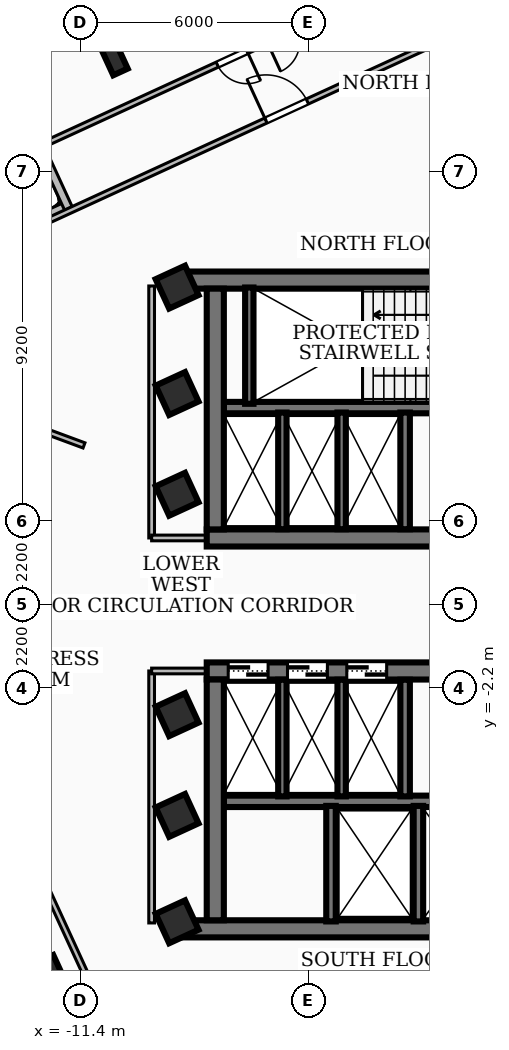
"""IFC4 building model, lengths in metres.
Left out: names, types, materials, properties, quantities, classifications, styles, units other than length and angle.
Written with IfcOpenShell. Run it as: python <this file> out.ifc"""

import sys

from ifc_helpers import new_model, si_unit, direction, frame, frame_2d, origin, origin_2d, place, context, subcontext, project, spatial, rectangle, i_section, extrude, element, fill, save


model = new_model("IFC4")
c1 = context("Model", 3, precision=1e-05, world=origin(), true_north=direction((0.0, 1.0)))
c2 = subcontext(c1, "Body", "Model", "MODEL_VIEW")
j1 = project(units=[si_unit("LENGTHUNIT", "METRE"), si_unit("PLANEANGLEUNIT", "RADIAN")], contexts=[c1])
p1 = place(None, origin())
s1 = spatial("IfcSite", under=j1, at=p1, CompositionType="ELEMENT")
p2 = place(p1, origin())
s2 = spatial("IfcBuilding", under=s1, at=p2, CompositionType="ELEMENT")
p3 = place(p2, frame((0.0, 0.0, 184.68)))
s3 = spatial("IfcBuildingStorey", under=s2, at=p3, CompositionType="ELEMENT", Elevation=184.68)
p4 = place(p3, frame((-8.78, 8.535, 0.0), z_axis=(0.0, 0.0, 1.0), x_axis=(1.0, 0.0, 0.0)))
e1 = element("IfcWall", 1, at=p4, inside=s3, PredefinedType="SHEAR", context=c2, shape_type="SweptSolid", body=[
    extrude(rectangle(XDim=17.56, YDim=0.45, at=frame_2d((8.78, 0.0))), origin(), (0.0, 0.0, 1.0), 3.34),
])
p5 = place(p3, frame((8.07, 1.75, 0.0), z_axis=(0.0, 0.0, 1.0), x_axis=(-1.0, 0.0, 0.0)))
e2 = element("IfcWall", 2, at=p5, inside=s3, PredefinedType="SHEAR", context=c2, shape_type="SweptSolid", body=[
    extrude(rectangle(XDim=16.14, YDim=0.45, at=frame_2d((8.07, 0.0))), origin(), (0.0, 0.0, 1.0), 3.34),
])
p6 = place(p5, frame((7.45, 0.0, 0.0)))
e3 = element("IfcOpeningElement", 3, at=p6, cuts=e2, PredefinedType="OPENING", context=c2, shape_type="SweptSolid", body=[
    extrude(rectangle(XDim=1.0, YDim=2.1, at=frame_2d((0.5, 1.05))), frame((0.0, 0.235, 0.0), z_axis=(0.0, -1.0, 0.0), x_axis=(1.0, 0.0, 0.0)), (0.0, 0.0, 1.0), 0.47),
])
p7 = place(p5, frame((3.4, 0.0, 0.0)))
e4 = element("IfcOpeningElement", 4, at=p7, cuts=e2, PredefinedType="OPENING", context=c2, shape_type="SweptSolid", body=[
    extrude(rectangle(XDim=0.9, YDim=2.06, at=frame_2d((0.45, 1.03))), frame((0.0, 0.235, 0.0), z_axis=(0.0, -1.0, 0.0), x_axis=(1.0, 0.0, 0.0)), (0.0, 0.0, 1.0), 0.47),
])
p8 = place(p5, frame((1.1, 0.0, 0.0)))
e5 = element("IfcOpeningElement", 5, at=p8, cuts=e2, PredefinedType="OPENING", context=c2, shape_type="SweptSolid", body=[
    extrude(rectangle(XDim=0.9, YDim=2.06, at=frame_2d((0.45, 1.03))), frame((0.0, 0.235, 0.0), z_axis=(0.0, -1.0, 0.0), x_axis=(1.0, 0.0, 0.0)), (0.0, 0.0, 1.0), 0.47),
])
p9 = place(p3, frame((-7.845, 1.975, 0.0), z_axis=(0.0, 0.0, 1.0), x_axis=(0.0, 1.0, 0.0)))
e6 = element("IfcWall", 6, at=p9, inside=s3, PredefinedType="SHEAR", context=c2, shape_type="SweptSolid", body=[
    extrude(rectangle(XDim=6.335, YDim=0.45, at=frame_2d((3.167, 0.0))), origin(), (0.0, 0.0, 1.0), 3.34),
])
p10 = place(p3, frame((7.62, 5.18, 0.0), z_axis=(0.0, 0.0, 1.0), x_axis=(-1.0, 0.0, 0.0)))
e7 = element("IfcWall", 7, at=p10, inside=s3, PredefinedType="SOLIDWALL", context=c2, shape_type="SweptSolid", body=[
    extrude(rectangle(XDim=15.24, YDim=0.3, at=frame_2d((7.62, 0.0))), origin(), (0.0, 0.0, 1.0), 3.34),
])
p11 = place(p10, frame((5.77, 0.0, 0.0)))
e8 = element("IfcOpeningElement", 8, at=p11, cuts=e7, PredefinedType="OPENING", context=c2, shape_type="SweptSolid", body=[
    extrude(rectangle(XDim=1.1, YDim=2.15, at=frame_2d((0.55, 1.075))), frame((0.0, 0.16, 0.0), z_axis=(0.0, -1.0, 0.0), x_axis=(1.0, 0.0, 0.0)), (0.0, 0.0, 1.0), 0.32),
])
p12 = place(p10, frame((2.97, 0.0, 0.0)))
e9 = element("IfcOpeningElement", 9, at=p12, cuts=e7, PredefinedType="OPENING", context=c2, shape_type="SweptSolid", body=[
    extrude(rectangle(XDim=1.1, YDim=2.15, at=frame_2d((0.55, 1.075))), frame((0.0, 0.16, 0.0), z_axis=(0.0, -1.0, 0.0), x_axis=(1.0, 0.0, 0.0)), (0.0, 0.0, 1.0), 0.32),
])
p13 = place(p10, frame((7.97, 0.0, 0.0)))
e10 = element("IfcOpeningElement", 10, at=p13, cuts=e7, PredefinedType="OPENING", context=c2, shape_type="SweptSolid", body=[
    extrude(rectangle(XDim=1.0, YDim=2.1, at=frame_2d((0.5, 1.05))), frame((0.0, 0.16, 0.0), z_axis=(0.0, -1.0, 0.0), x_axis=(1.0, 0.0, 0.0)), (0.0, 0.0, 1.0), 0.32),
])
p14 = place(p3, frame((8.78, -8.535, 0.0), z_axis=(0.0, 0.0, 1.0), x_axis=(-1.0, 0.0, 0.0)))
e11 = element("IfcWall", 11, at=p14, inside=s3, PredefinedType="SHEAR", context=c2, shape_type="SweptSolid", body=[
    extrude(rectangle(XDim=17.56, YDim=0.45, at=frame_2d((8.78, 0.0))), origin(), (0.0, 0.0, 1.0), 3.34),
])
p15 = place(p3, frame((-8.07, -1.75, 0.0), z_axis=(0.0, 0.0, 1.0), x_axis=(1.0, 0.0, 0.0)))
e12 = element("IfcWall", 12, at=p15, inside=s3, PredefinedType="SHEAR", context=c2, shape_type="SweptSolid", body=[
    extrude(rectangle(XDim=16.14, YDim=0.45, at=frame_2d((8.07, 0.0))), origin(), (0.0, 0.0, 1.0), 3.34),
])
p16 = place(p15, frame((7.45, 0.0, 0.0)))
e13 = element("IfcOpeningElement", 13, at=p16, cuts=e12, PredefinedType="OPENING", context=c2, shape_type="SweptSolid", body=[
    extrude(rectangle(XDim=1.0, YDim=2.1, at=frame_2d((0.5, 1.05))), frame((0.0, 0.235, 0.0), z_axis=(0.0, -1.0, 0.0), x_axis=(1.0, 0.0, 0.0)), (0.0, 0.0, 1.0), 0.47),
])
p17 = place(p15, frame((12.65, 0.0, 0.0)))
e14 = element("IfcOpeningElement", 14, at=p17, cuts=e12, PredefinedType="OPENING", context=c2, shape_type="SweptSolid", body=[
    extrude(rectangle(XDim=0.9, YDim=2.06, at=frame_2d((0.45, 1.03))), frame((0.0, 0.235, 0.0), z_axis=(0.0, -1.0, 0.0), x_axis=(1.0, 0.0, 0.0)), (0.0, 0.0, 1.0), 0.47),
])
p18 = place(p15, frame((0.565, 0.0, 0.0)))
e15 = element("IfcOpeningElement", 15, at=p18, cuts=e12, PredefinedType="OPENING", context=c2, shape_type="SweptSolid", body=[
    extrude(rectangle(XDim=1.05, YDim=2.15, at=frame_2d((0.525, 1.075))), frame((0.0, 0.235, 0.0), z_axis=(0.0, -1.0, 0.0), x_axis=(1.0, 0.0, 0.0)), (0.0, 0.0, 1.0), 0.47),
])
p19 = place(p15, frame((2.125, 0.0, 0.0)))
e16 = element("IfcOpeningElement", 16, at=p19, cuts=e12, PredefinedType="OPENING", context=c2, shape_type="SweptSolid", body=[
    extrude(rectangle(XDim=1.05, YDim=2.15, at=frame_2d((0.525, 1.075))), frame((0.0, 0.235, 0.0), z_axis=(0.0, -1.0, 0.0), x_axis=(1.0, 0.0, 0.0)), (0.0, 0.0, 1.0), 0.47),
])
p20 = place(p15, frame((3.685, 0.0, 0.0)))
e17 = element("IfcOpeningElement", 17, at=p20, cuts=e12, PredefinedType="OPENING", context=c2, shape_type="SweptSolid", body=[
    extrude(rectangle(XDim=1.05, YDim=2.15, at=frame_2d((0.525, 1.075))), frame((0.0, 0.235, 0.0), z_axis=(0.0, -1.0, 0.0), x_axis=(1.0, 0.0, 0.0)), (0.0, 0.0, 1.0), 0.47),
])
p21 = place(p3, frame((-7.845, -8.31, 0.0), z_axis=(0.0, 0.0, 1.0), x_axis=(0.0, 1.0, 0.0)))
e18 = element("IfcWall", 18, at=p21, inside=s3, PredefinedType="SHEAR", context=c2, shape_type="SweptSolid", body=[
    extrude(rectangle(XDim=6.335, YDim=0.45, at=frame_2d((3.167, 0.0))), origin(), (0.0, 0.0, 1.0), 3.34),
])
p22 = place(p3, frame((-7.62, -5.18, 0.0), z_axis=(0.0, 0.0, 1.0), x_axis=(1.0, 0.0, 0.0)))
e19 = element("IfcWall", 19, at=p22, inside=s3, PredefinedType="SOLIDWALL", context=c2, shape_type="SweptSolid", body=[
    extrude(rectangle(XDim=15.24, YDim=0.3, at=frame_2d((7.62, 0.0))), origin(), (0.0, 0.0, 1.0), 3.34),
])
p23 = place(p22, frame((5.77, 0.0, 0.0)))
e20 = element("IfcOpeningElement", 20, at=p23, cuts=e19, PredefinedType="OPENING", context=c2, shape_type="SweptSolid", body=[
    extrude(rectangle(XDim=1.1, YDim=2.15, at=frame_2d((0.55, 1.075))), frame((0.0, 0.16, 0.0), z_axis=(0.0, -1.0, 0.0), x_axis=(1.0, 0.0, 0.0)), (0.0, 0.0, 1.0), 0.32),
])
p24 = place(p22, frame((7.97, 0.0, 0.0)))
e21 = element("IfcOpeningElement", 21, at=p24, cuts=e19, PredefinedType="OPENING", context=c2, shape_type="SweptSolid", body=[
    extrude(rectangle(XDim=1.0, YDim=2.1, at=frame_2d((0.5, 1.05))), frame((0.0, 0.16, 0.0), z_axis=(0.0, -1.0, 0.0), x_axis=(1.0, 0.0, 0.0)), (0.0, 0.0, 1.0), 0.32),
])
p25 = place(p3, frame((-6.95, 5.28, 0.0), z_axis=(0.0, 0.0, 1.0), x_axis=(0.0, 1.0, 0.0)))
e22 = element("IfcWall", 22, at=p25, inside=s3, PredefinedType="SOLIDWALL", context=c2, shape_type="SweptSolid", body=[
    extrude(rectangle(XDim=3.06, YDim=0.22, at=frame_2d((1.53, 0.0))), origin(), (0.0, 0.0, 1.0), 3.34),
])
p26 = place(p3, frame((-2.85, 1.98, 0.0), z_axis=(0.0, 0.0, 1.0), x_axis=(0.0, 1.0, 0.0)))
e23 = element("IfcWall", 23, at=p26, inside=s3, PredefinedType="SOLIDWALL", context=c2, shape_type="SweptSolid", body=[
    extrude(rectangle(XDim=3.07, YDim=0.25, at=frame_2d((1.535, 0.0))), origin(), (0.0, 0.0, 1.0), 3.34),
])
for number, where, z_axis, x_axis in (
    (24, (-2.5, -8.34, 0.0), (0.0, 0.0, 1.0), (0.0, 1.0, 0.0)),
    (25, (-4.8, -8.34, 0.0), (0.0, 0.0, 1.0), (0.0, 1.0, 0.0)),
):
    element("IfcWall", number, at=place(p3, frame(where, z_axis=z_axis, x_axis=x_axis)), inside=s3, PredefinedType="SOLIDWALL", context=c2, shape_type="SweptSolid", body=[
        extrude(rectangle(XDim=3.04, YDim=0.25, at=frame_2d((1.52, 0.0))), origin(), (0.0, 0.0, 1.0), 3.34),
    ])
p27 = place(p3, frame((-2.85, -5.05, 0.0), z_axis=(0.0, 0.0, 1.0), x_axis=(0.0, 1.0, 0.0)))
e26 = element("IfcWall", 26, at=p27, inside=s3, PredefinedType="SOLIDWALL", context=c2, shape_type="SweptSolid", body=[
    extrude(rectangle(XDim=3.07, YDim=0.25, at=frame_2d((1.535, 0.0))), origin(), (0.0, 0.0, 1.0), 3.34),
])
for number, where, z_axis, x_axis in (
    (27, (-6.08, 1.98, 0.0), (0.0, 0.0, 1.0), (0.0, 1.0, 0.0)),
    (28, (-4.52, 1.98, 0.0), (0.0, 0.0, 1.0), (0.0, 1.0, 0.0)),
    (29, (-6.08, -5.05, 0.0), (0.0, 0.0, 1.0), (0.0, 1.0, 0.0)),
    (30, (-4.52, -5.05, 0.0), (0.0, 0.0, 1.0), (0.0, 1.0, 0.0)),
):
    element("IfcWall", number, at=place(p3, frame(where, z_axis=z_axis, x_axis=x_axis)), inside=s3, PredefinedType="SOLIDWALL", context=c2, shape_type="SweptSolid", body=[
        extrude(rectangle(XDim=3.07, YDim=0.22, at=frame_2d((1.535, 0.0))), origin(), (0.0, 0.0, 1.0), 3.34),
    ])
for number, where, z_axis, x_axis in (
    (31, (-8.85, -5.55, 0.0), (0.0, 0.0, 1.0), (0.909, 0.418, 0.0)),
    (32, (-8.85, -2.9, 0.0), (0.0, 0.0, 1.0), (0.909, 0.418, 0.0)),
    (33, (-8.85, 2.9, 0.0), (0.0, 0.0, 1.0), (0.909, 0.418, 0.0)),
    (34, (-8.85, 5.55, 0.0), (0.0, 0.0, 1.0), (0.909, 0.418, 0.0)),
    (35, (-8.85, 8.35, 0.0), (0.0, 0.0, 1.0), (0.909, 0.418, 0.0)),
    (36, (-8.85, -8.35, 0.0), (0.0, 0.0, 1.0), (0.909, 0.418, 0.0)),
):
    element("IfcColumn", number, at=place(p3, frame(where, z_axis=z_axis, x_axis=x_axis)), inside=s3, PredefinedType="COLUMN", context=c2, shape_type="SweptSolid", body=[
        extrude(rectangle(XDim=0.85, YDim=0.85, at=origin_2d()), origin(), (0.0, 0.0, 1.0), 3.6),
    ])
for number, where, z_axis, x_axis in (
    (37, (-10.533, 14.433, 0.0), (0.0, 0.0, 1.0), (0.909, 0.418, 0.0)),
    (38, (-12.106, -9.731, 0.0), (0.0, 0.0, 1.0), (0.909, 0.418, 0.0)),
):
    element("IfcColumn", number, at=place(p3, frame(where, z_axis=z_axis, x_axis=x_axis)), inside=s3, PredefinedType="COLUMN", context=c2, shape_type="SweptSolid", body=[
        extrude(i_section(OverallWidth=0.418, OverallDepth=0.927, WebThickness=0.019, FlangeThickness=0.032, at=origin_2d()), origin(), (0.0, 0.0, 1.0), 3.6),
    ])
p28 = place(p3, frame((-17.806, 7.71, 0.0), z_axis=(0.0, 0.0, 1.0), x_axis=(0.908646468859, 0.417566275734, 0.0)))
e39 = element("IfcWall", 39, at=p28, inside=s3, PredefinedType="SOLIDWALL", context=c2, shape_type="SweptSolid", body=[
    extrude(rectangle(XDim=6.758, YDim=0.22, at=frame_2d((3.379, 0.0))), origin(), (0.0, 0.0, 1.0), 3.34),
])
p29 = place(p3, frame((-11.708, 10.415, 0.0), z_axis=(0.0, 0.0, 1.0), x_axis=(-0.417525901293, 0.908665021748, 0.0)))
e40 = element("IfcWall", 40, at=p29, inside=s3, PredefinedType="SOLIDWALL", context=c2, shape_type="SweptSolid", body=[
    extrude(rectangle(XDim=8.258, YDim=0.22, at=frame_2d((4.129, 0.0))), origin(), (0.0, 0.0, 1.0), 3.34),
])
p30 = place(p29, frame((2.35, 0.0, 0.85)))
e41 = element("IfcOpeningElement", 41, at=p30, cuts=e40, PredefinedType="OPENING", context=c2, shape_type="SweptSolid", body=[
    extrude(rectangle(XDim=1.5, YDim=1.8, at=frame_2d((0.75, 0.9))), frame((0.0, 0.12, 0.0), z_axis=(0.0, -1.0, 0.0), x_axis=(1.0, 0.0, 0.0)), (0.0, 0.0, 1.0), 0.24),
])
p31 = place(p3, frame((-9.52, 1.75, 0.0), z_axis=(0.0, 0.0, 1.0), x_axis=(0.0, 1.0, 0.0)))
e42 = element("IfcWall", 42, at=p31, inside=s3, PredefinedType="PARTITIONING", context=c2, shape_type="SweptSolid", body=[
    extrude(rectangle(XDim=6.63, YDim=0.15, at=frame_2d((3.315, 0.0))), origin(), (0.0, 0.0, 1.0), 3.34),
])
p32 = place(p3, frame((-7.85, 1.75, 0.0), z_axis=(0.0, 0.0, 1.0), x_axis=(-1.0, 0.0, 0.0)))
e43 = element("IfcWall", 43, at=p32, inside=s3, PredefinedType="PARTITIONING", context=c2, shape_type="SweptSolid", body=[
    extrude(rectangle(XDim=1.67, YDim=0.15, at=frame_2d((0.835, 0.0))), origin(), (0.0, 0.0, 1.0), 2.57),
])
p33 = place(p3, frame((-9.52, -8.38, 0.0), z_axis=(0.0, 0.0, 1.0), x_axis=(0.0, 1.0, 0.0)))
e44 = element("IfcWall", 44, at=p33, inside=s3, PredefinedType="PARTITIONING", context=c2, shape_type="SweptSolid", body=[
    extrude(rectangle(XDim=6.63, YDim=0.15, at=frame_2d((3.315, 0.0))), origin(), (0.0, 0.0, 1.0), 2.644),
])
p34 = place(p3, frame((-7.85, -1.75, 0.0), z_axis=(0.0, 0.0, 1.0), x_axis=(-1.0, 0.0, 0.0)))
e45 = element("IfcWall", 45, at=p34, inside=s3, PredefinedType="PARTITIONING", context=c2, shape_type="SweptSolid", body=[
    extrude(rectangle(XDim=1.67, YDim=0.15, at=frame_2d((0.835, 0.0))), origin(), (0.0, 0.0, 1.0), 2.57),
])
p35 = place(p3, frame((-11.3, 4.185, 0.0), z_axis=(0.0, 0.0, 1.0), x_axis=(-0.937797421925, 0.347182942311, 0.0)))
e46 = element("IfcWall", 46, at=p35, inside=s3, PredefinedType="PARTITIONING", context=c2, shape_type="SweptSolid", body=[
    extrude(rectangle(XDim=7.624, YDim=0.145, at=frame_2d((3.812, 0.0))), origin(), (0.0, 0.0, 1.0), 3.34),
])
p36 = place(p3, frame((-15.508, 8.6, 0.0), z_axis=(0.0, 0.0, 1.0), x_axis=(0.908644148726, 0.41757132443, 0.0)))
e47 = element("IfcWall", 47, at=p36, inside=s3, PredefinedType="PARTITIONING", context=c2, shape_type="SweptSolid", body=[
    extrude(rectangle(XDim=20.521, YDim=0.145, at=frame_2d((10.26, 0.0))), origin(), (0.0, 0.0, 1.0), 2.644),
])
p37 = place(p36, frame((9.9, 0.0, 0.0)))
e48 = element("IfcOpeningElement", 48, at=p37, cuts=e47, PredefinedType="OPENING", context=c2, shape_type="SweptSolid", body=[
    extrude(rectangle(XDim=1.2, YDim=2.1, at=frame_2d((0.6, 1.05))), frame((0.0, 0.083, 0.0), z_axis=(0.0, -1.0, 0.0), x_axis=(1.0, 0.0, 0.0)), (0.0, 0.0, 1.0), 0.165),
])
p38 = place(p3, frame((-0.664, 17.48, 0.0), z_axis=(0.0, 0.0, 1.0), x_axis=(-0.908648339266, -0.417562205605, 0.0)))
e49 = element("IfcWall", 49, at=p38, inside=s3, PredefinedType="PARTITIONING", context=c2, shape_type="SweptSolid", body=[
    extrude(rectangle(XDim=12.91, YDim=0.145, at=frame_2d((6.455, 0.0))), origin(), (0.0, 0.0, 1.0), 2.644),
])
p39 = place(p38, frame((5.545, 0.0, 0.0)))
e50 = element("IfcOpeningElement", 50, at=p39, cuts=e49, PredefinedType="OPENING", context=c2, shape_type="SweptSolid", body=[
    extrude(rectangle(XDim=0.86, YDim=2.04, at=frame_2d((0.43, 1.02))), frame((0.0, 0.083, 0.0), z_axis=(0.0, -1.0, 0.0), x_axis=(1.0, 0.0, 0.0)), (0.0, 0.0, 1.0), 0.165),
])
p40 = place(p38, frame((6.985, 0.0, 0.0)))
e51 = element("IfcOpeningElement", 51, at=p40, cuts=e49, PredefinedType="OPENING", context=c2, shape_type="SweptSolid", body=[
    extrude(rectangle(XDim=0.86, YDim=2.04, at=frame_2d((0.43, 1.02))), frame((0.0, 0.083, 0.0), z_axis=(0.0, -1.0, 0.0), x_axis=(1.0, 0.0, 0.0)), (0.0, 0.0, 1.0), 0.165),
])
p41 = place(p3, frame((-8.6, -15.508, 0.0), z_axis=(0.0, 0.0, 1.0), x_axis=(-0.41757132443, 0.908644148726, 0.0)))
e52 = element("IfcWall", 52, at=p41, inside=s3, PredefinedType="PARTITIONING", context=c2, shape_type="SweptSolid", body=[
    extrude(rectangle(XDim=20.521, YDim=0.145, at=frame_2d((10.26, 0.0))), origin(), (0.0, 0.0, 1.0), 2.644),
])
p42 = place(p41, frame((9.9, 0.0, 0.0)))
e53 = element("IfcOpeningElement", 53, at=p42, cuts=e52, PredefinedType="OPENING", context=c2, shape_type="SweptSolid", body=[
    extrude(rectangle(XDim=1.2, YDim=2.1, at=frame_2d((0.6, 1.05))), frame((0.0, 0.083, 0.0), z_axis=(0.0, -1.0, 0.0), x_axis=(1.0, 0.0, 0.0)), (0.0, 0.0, 1.0), 0.165),
])
p43 = place(p3, frame((15.508, -8.6, 0.0), z_axis=(0.0, 0.0, 1.0), x_axis=(-0.908644148726, -0.41757132443, 0.0)))
e54 = element("IfcWall", 54, at=p43, inside=s3, PredefinedType="PARTITIONING", context=c2, shape_type="SweptSolid", body=[
    extrude(rectangle(XDim=20.521, YDim=0.145, at=frame_2d((10.26, 0.0))), origin(), (0.0, 0.0, 1.0), 2.644),
])
p44 = place(p43, frame((9.9, 0.0, 0.0)))
e55 = element("IfcOpeningElement", 55, at=p44, cuts=e54, PredefinedType="OPENING", context=c2, shape_type="SweptSolid", body=[
    extrude(rectangle(XDim=1.2, YDim=2.1, at=frame_2d((0.6, 1.05))), frame((0.0, 0.083, 0.0), z_axis=(0.0, -1.0, 0.0), x_axis=(1.0, 0.0, 0.0)), (0.0, 0.0, 1.0), 0.165),
])
p45 = place(p18, origin())
e56 = element("IfcDoor", 56, at=p45, inside=s3, OperationType="DOUBLE_DOOR_SLIDING", PredefinedType="DOOR", context=c2, shape_type="SweptSolid", body=[
    extrude(rectangle(XDim=1.05, YDim=2.15, at=frame_2d((0.525, 1.075))), frame((0.0, 0.025, 0.0), z_axis=(0.0, -1.0, 0.0), x_axis=(1.0, 0.0, 0.0)), (0.0, 0.0, 1.0), 0.05),
])
fill(e15, e56)
p46 = place(p19, origin())
e57 = element("IfcDoor", 57, at=p46, inside=s3, OperationType="DOUBLE_DOOR_SLIDING", PredefinedType="DOOR", context=c2, shape_type="SweptSolid", body=[
    extrude(rectangle(XDim=1.05, YDim=2.15, at=frame_2d((0.525, 1.075))), frame((0.0, 0.025, 0.0), z_axis=(0.0, -1.0, 0.0), x_axis=(1.0, 0.0, 0.0)), (0.0, 0.0, 1.0), 0.05),
])
fill(e16, e57)
p47 = place(p20, origin())
e58 = element("IfcDoor", 58, at=p47, inside=s3, OperationType="DOUBLE_DOOR_SLIDING", PredefinedType="DOOR", context=c2, shape_type="SweptSolid", body=[
    extrude(rectangle(XDim=1.05, YDim=2.15, at=frame_2d((0.525, 1.075))), frame((0.0, 0.025, 0.0), z_axis=(0.0, -1.0, 0.0), x_axis=(1.0, 0.0, 0.0)), (0.0, 0.0, 1.0), 0.05),
])
fill(e17, e58)
p48 = place(p37, origin())
e59 = element("IfcDoor", 59, at=p48, inside=s3, OperationType="SINGLE_SWING_LEFT", PredefinedType="DOOR", context=c2, shape_type="SweptSolid", body=[
    extrude(rectangle(XDim=1.2, YDim=2.1, at=frame_2d((0.6, 1.05))), frame((0.0, 0.025, 0.0), z_axis=(0.0, -1.0, 0.0), x_axis=(1.0, 0.0, 0.0)), (0.0, 0.0, 1.0), 0.05),
])
fill(e48, e59)
p49 = place(p40, origin())
e60 = element("IfcDoor", 60, at=p49, inside=s3, OperationType="SINGLE_SWING_LEFT", PredefinedType="DOOR", context=c2, shape_type="SweptSolid", body=[
    extrude(rectangle(XDim=0.86, YDim=2.04, at=frame_2d((0.43, 1.02))), frame((0.0, 0.025, 0.0), z_axis=(0.0, -1.0, 0.0), x_axis=(1.0, 0.0, 0.0)), (0.0, 0.0, 1.0), 0.05),
])
fill(e51, e60)
save(model, sys.argv[1])
